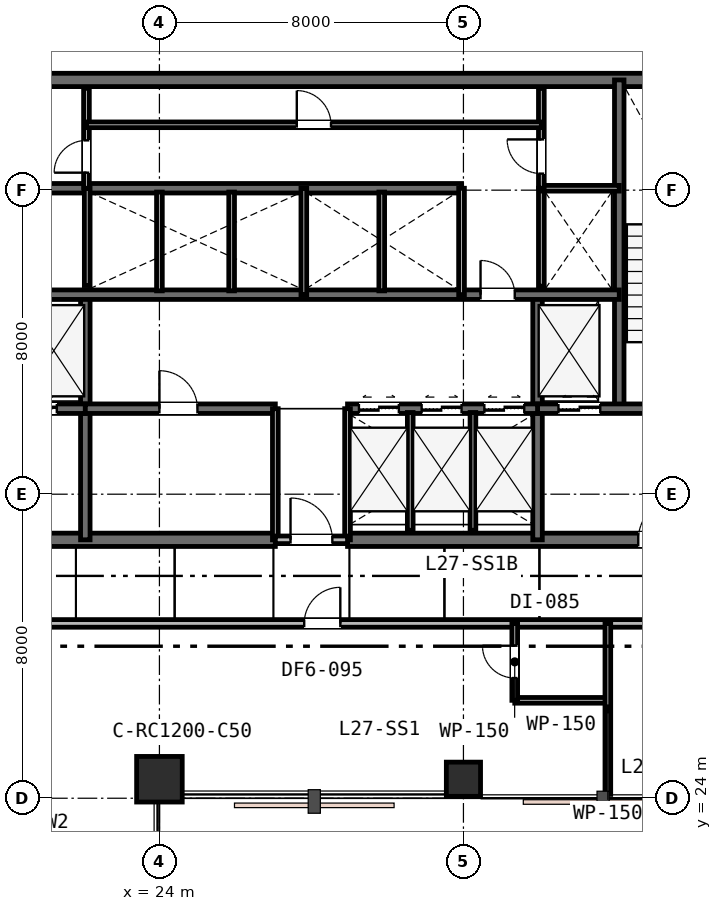
"""IFC4 building model, lengths in metres.
Left out: names, types, materials, properties, quantities, classifications, styles, units other than length and angle.
Written with IfcOpenShell. Run it as: python <this file> out.ifc"""

import sys

from ifc_helpers import new_model, si_unit, direction, frame, frame_2d, origin, origin_2d, place, context, subcontext, project, spatial, rectangle, extrude, element, fill, save


model = new_model("IFC4")
c1 = context("Model", 3, precision=1e-05, world=origin(), true_north=direction((0.0, 1.0)))
c2 = subcontext(c1, "Body", "Model", "MODEL_VIEW")
j1 = project(units=[si_unit("LENGTHUNIT", "METRE"), si_unit("PLANEANGLEUNIT", "RADIAN")], contexts=[c1])
p1 = place(None, origin())
s1 = spatial("IfcSite", under=j1, at=p1, CompositionType="ELEMENT")
p2 = place(p1, origin())
s2 = spatial("IfcBuilding", under=s1, at=p2, CompositionType="ELEMENT")
p3 = place(p2, frame((0.0, 0.0, 108.0)))
s3 = spatial("IfcBuildingStorey", under=s2, at=p3, CompositionType="ELEMENT", Elevation=108.0)
p4 = place(p3, frame((15.85, 42.9, 0.0), z_axis=(0.0, 0.0, 1.0), x_axis=(1.0, 0.0, 0.0)))
e1 = element("IfcWall", 1, at=p4, inside=s3, PredefinedType="SHEAR", context=c2, shape_type="SweptSolid", body=[
    extrude(rectangle(XDim=24.3, YDim=0.35, at=frame_2d((12.15, 0.0))), origin(), (0.0, 0.0, 1.0), 3.6),
])
p5 = place(p3, frame((15.85, 30.8, 0.0), z_axis=(0.0, 0.0, 1.0), x_axis=(1.0, 0.0, 0.0)))
e2 = element("IfcWall", 2, at=p5, inside=s3, PredefinedType="SHEAR", context=c2, shape_type="SweptSolid", body=[
    extrude(rectangle(XDim=11.2, YDim=0.35, at=frame_2d((5.6, 0.0))), origin(), (0.0, 0.0, 1.0), 3.6),
])
p6 = place(p5, frame((2.45, 0.0, 0.0)))
e3 = element("IfcOpeningElement", 3, at=p6, cuts=e2, PredefinedType="OPENING", context=c2, shape_type="SweptSolid", body=[
    extrude(rectangle(XDim=1.1, YDim=2.15, at=frame_2d((0.55, 1.075))), frame((0.0, 0.185, 0.0), z_axis=(0.0, -1.0, 0.0), x_axis=(1.0, 0.0, 0.0)), (0.0, 0.0, 1.0), 0.37),
])
p7 = place(p3, frame((28.95, 30.8, 0.0), z_axis=(0.0, 0.0, 1.0), x_axis=(1.0, 0.0, 0.0)))
e4 = element("IfcWall", 4, at=p7, inside=s3, PredefinedType="SHEAR", context=c2, shape_type="SweptSolid", body=[
    extrude(rectangle(XDim=11.2, YDim=0.35, at=frame_2d((5.6, 0.0))), origin(), (0.0, 0.0, 1.0), 3.6),
])
p8 = place(p7, frame((7.65, 0.0, 0.0)))
e5 = element("IfcOpeningElement", 5, at=p8, cuts=e4, PredefinedType="OPENING", context=c2, shape_type="SweptSolid", body=[
    extrude(rectangle(XDim=1.1, YDim=2.15, at=frame_2d((0.55, 1.075))), frame((0.0, 0.185, 0.0), z_axis=(0.0, -1.0, 0.0), x_axis=(1.0, 0.0, 0.0)), (0.0, 0.0, 1.0), 0.37),
])
p9 = place(p3, frame((36.1, 34.25, 0.0), z_axis=(0.0, 0.0, 1.0), x_axis=(0.0, 1.0, 0.0)))
e6 = element("IfcWall", 6, at=p9, inside=s3, PredefinedType="SHEAR", context=c2, shape_type="SweptSolid", body=[
    extrude(rectangle(XDim=8.65, YDim=0.25, at=frame_2d((4.325, 0.0))), origin(), (0.0, 0.0, 1.0), 3.6),
])
for number, where, z_axis, x_axis in (
    (7, (22.05, 30.8, 0.0), (0.0, 0.0, 1.0), (0.0, 1.0, 0.0)),
    (8, (33.95, 30.8, 0.0), (0.0, 0.0, 1.0), (0.0, 1.0, 0.0)),
):
    element("IfcWall", number, at=place(p3, frame(where, z_axis=z_axis, x_axis=x_axis)), inside=s3, PredefinedType="SHEAR", context=c2, shape_type="SweptSolid", body=[
        extrude(rectangle(XDim=6.45, YDim=0.25, at=frame_2d((3.225, 0.0))), origin(), (0.0, 0.0, 1.0), 3.6),
    ])
p10 = place(p3, frame((16.0, 34.25, 0.0), z_axis=(0.0, 0.0, 1.0), x_axis=(1.0, 0.0, 0.0)))
e9 = element("IfcWall", 9, at=p10, inside=s3, PredefinedType="SHEAR", context=c2, shape_type="SweptSolid", body=[
    extrude(rectangle(XDim=6.05, YDim=0.25, at=frame_2d((3.025, 0.0))), origin(), (0.0, 0.0, 1.0), 3.6),
])
p11 = place(p10, frame((1.25, 0.0, 0.0)))
e10 = element("IfcOpeningElement", 10, at=p11, cuts=e9, PredefinedType="OPENING", context=c2, shape_type="SweptSolid", body=[
    extrude(rectangle(XDim=1.0, YDim=2.15, at=frame_2d((0.5, 1.075))), frame((0.0, 0.135, 0.0), z_axis=(0.0, -1.0, 0.0), x_axis=(1.0, 0.0, 0.0)), (0.0, 0.0, 1.0), 0.27),
])
p12 = place(p10, frame((4.2, 0.0, 0.0)))
e11 = element("IfcOpeningElement", 11, at=p12, cuts=e9, PredefinedType="OPENING", context=c2, shape_type="SweptSolid", body=[
    extrude(rectangle(XDim=1.1, YDim=2.15, at=frame_2d((0.55, 1.075))), frame((0.0, 0.135, 0.0), z_axis=(0.0, -1.0, 0.0), x_axis=(1.0, 0.0, 0.0)), (0.0, 0.0, 1.0), 0.27),
])
p13 = place(p3, frame((33.95, 34.25, 0.0), z_axis=(0.0, 0.0, 1.0), x_axis=(1.0, 0.0, 0.0)))
e12 = element("IfcWall", 12, at=p13, inside=s3, PredefinedType="SHEAR", context=c2, shape_type="SweptSolid", body=[
    extrude(rectangle(XDim=6.05, YDim=0.25, at=frame_2d((3.025, 0.0))), origin(), (0.0, 0.0, 1.0), 3.6),
])
p14 = place(p13, frame((3.7, 0.0, 0.0)))
e13 = element("IfcOpeningElement", 13, at=p14, cuts=e12, PredefinedType="OPENING", context=c2, shape_type="SweptSolid", body=[
    extrude(rectangle(XDim=1.0, YDim=2.15, at=frame_2d((0.5, 1.075))), frame((0.0, 0.135, 0.0), z_axis=(0.0, -1.0, 0.0), x_axis=(1.0, 0.0, 0.0)), (0.0, 0.0, 1.0), 0.27),
])
p15 = place(p13, frame((0.55, 0.0, 0.0)))
e14 = element("IfcOpeningElement", 14, at=p15, cuts=e12, PredefinedType="OPENING", context=c2, shape_type="SweptSolid", body=[
    extrude(rectangle(XDim=1.1, YDim=2.15, at=frame_2d((0.55, 1.075))), frame((0.0, 0.135, 0.0), z_axis=(0.0, -1.0, 0.0), x_axis=(1.0, 0.0, 0.0)), (0.0, 0.0, 1.0), 0.27),
])
p16 = place(p3, frame((22.05, 34.25, 0.0), z_axis=(0.0, 0.0, 1.0), x_axis=(1.0, 0.0, 0.0)))
e15 = element("IfcWall", 15, at=p16, inside=s3, PredefinedType="SHEAR", context=c2, shape_type="SweptSolid", body=[
    extrude(rectangle(XDim=5.0, YDim=0.25, at=frame_2d((2.5, 0.0))), origin(), (0.0, 0.0, 1.0), 3.6),
])
p17 = place(p16, frame((1.95, 0.0, 0.0)))
e16 = element("IfcOpeningElement", 16, at=p17, cuts=e15, PredefinedType="OPENING", context=c2, shape_type="SweptSolid", body=[
    extrude(rectangle(XDim=1.0, YDim=2.15, at=frame_2d((0.5, 1.075))), frame((0.0, 0.135, 0.0), z_axis=(0.0, -1.0, 0.0), x_axis=(1.0, 0.0, 0.0)), (0.0, 0.0, 1.0), 0.27),
])
p18 = place(p3, frame((28.95, 34.25, 0.0), z_axis=(0.0, 0.0, 1.0), x_axis=(1.0, 0.0, 0.0)))
e17 = element("IfcWall", 17, at=p18, inside=s3, PredefinedType="SHEAR", context=c2, shape_type="SweptSolid", body=[
    extrude(rectangle(XDim=5.0, YDim=0.25, at=frame_2d((2.5, 0.0))), origin(), (0.0, 0.0, 1.0), 3.6),
])
p19 = place(p18, frame((0.3, 0.0, 0.0)))
e18 = element("IfcOpeningElement", 18, at=p19, cuts=e17, PredefinedType="OPENING", context=c2, shape_type="SweptSolid", body=[
    extrude(rectangle(XDim=1.05, YDim=2.15, at=frame_2d((0.525, 1.075))), frame((0.0, 0.135, 0.0), z_axis=(0.0, -1.0, 0.0), x_axis=(1.0, 0.0, 0.0)), (0.0, 0.0, 1.0), 0.27),
])
p20 = place(p18, frame((1.95, 0.0, 0.0)))
e19 = element("IfcOpeningElement", 19, at=p20, cuts=e17, PredefinedType="OPENING", context=c2, shape_type="SweptSolid", body=[
    extrude(rectangle(XDim=1.05, YDim=2.15, at=frame_2d((0.525, 1.075))), frame((0.0, 0.135, 0.0), z_axis=(0.0, -1.0, 0.0), x_axis=(1.0, 0.0, 0.0)), (0.0, 0.0, 1.0), 0.27),
])
p21 = place(p18, frame((3.6, 0.0, 0.0)))
e20 = element("IfcOpeningElement", 20, at=p21, cuts=e17, PredefinedType="OPENING", context=c2, shape_type="SweptSolid", body=[
    extrude(rectangle(XDim=1.05, YDim=2.15, at=frame_2d((0.525, 1.075))), frame((0.0, 0.135, 0.0), z_axis=(0.0, -1.0, 0.0), x_axis=(1.0, 0.0, 0.0)), (0.0, 0.0, 1.0), 0.27),
])
p22 = place(p3, frame((19.9, 37.25, 0.0), z_axis=(0.0, 0.0, 1.0), x_axis=(1.0, 0.0, 0.0)))
e21 = element("IfcWall", 21, at=p22, inside=s3, PredefinedType="SHEAR", context=c2, shape_type="SweptSolid", body=[
    extrude(rectangle(XDim=16.2, YDim=0.25, at=frame_2d((8.1, 0.0))), origin(), (0.0, 0.0, 1.0), 3.6),
])
p23 = place(p22, frame((12.55, 0.0, 0.0)))
e22 = element("IfcOpeningElement", 22, at=p23, cuts=e21, PredefinedType="OPENING", context=c2, shape_type="SweptSolid", body=[
    extrude(rectangle(XDim=0.9, YDim=2.15, at=frame_2d((0.45, 1.075))), frame((0.0, 0.135, 0.0), z_axis=(0.0, -1.0, 0.0), x_axis=(1.0, 0.0, 0.0)), (0.0, 0.0, 1.0), 0.27),
])
p24 = place(p3, frame((19.9, 40.05, 0.0), z_axis=(0.0, 0.0, 1.0), x_axis=(1.0, 0.0, 0.0)))
e23 = element("IfcWall", 23, at=p24, inside=s3, PredefinedType="SHEAR", context=c2, shape_type="SweptSolid", body=[
    extrude(rectangle(XDim=12.05, YDim=0.25, at=frame_2d((6.025, 0.0))), origin(), (0.0, 0.0, 1.0), 3.6),
])
p25 = place(p3, frame((24.0, 24.5, 0.0), z_axis=(0.0, 0.0, 1.0), x_axis=(1.0, 0.0, 0.0)))
e24 = element("IfcColumn", 24, at=p25, inside=s3, PredefinedType="COLUMN", context=c2, shape_type="SweptSolid", body=[
    extrude(rectangle(XDim=1.2, YDim=1.2, at=origin_2d()), origin(), (0.0, 0.0, 1.0), 3.6),
])
p26 = place(p3, frame((32.0, 24.5, 0.0), z_axis=(0.0, 0.0, 1.0), x_axis=(1.0, 0.0, 0.0)))
e25 = element("IfcColumn", 25, at=p26, inside=s3, PredefinedType="COLUMN", context=c2, shape_type="SweptSolid", body=[
    extrude(rectangle(XDim=0.9, YDim=0.9, at=origin_2d()), origin(), (0.0, 0.0, 1.0), 3.6),
])
p27 = place(p3, frame((27.05, 30.8, 0.0), z_axis=(0.0, 0.0, 1.0), x_axis=(0.0, 1.0, 0.0)))
e26 = element("IfcWall", 26, at=p27, inside=s3, PredefinedType="PLUMBINGWALL", context=c2, shape_type="SweptSolid", body=[
    extrude(rectangle(XDim=3.45, YDim=0.15, at=frame_2d((1.725, 0.0))), origin(), (0.0, 0.0, 1.0), 3.01),
])
p28 = place(p3, frame((28.95, 30.8, 0.0), z_axis=(0.0, 0.0, 1.0), x_axis=(0.0, 1.0, 0.0)))
e27 = element("IfcWall", 27, at=p28, inside=s3, PredefinedType="PLUMBINGWALL", context=c2, shape_type="SweptSolid", body=[
    extrude(rectangle(XDim=3.45, YDim=0.15, at=frame_2d((1.725, 0.0))), origin(), (0.0, 0.0, 1.0), 3.33),
])
p29 = place(p3, frame((27.05, 30.8, 0.0), z_axis=(0.0, 0.0, 1.0), x_axis=(1.0, 0.0, 0.0)))
e28 = element("IfcWall", 28, at=p29, inside=s3, PredefinedType="PARTITIONING", context=c2, shape_type="SweptSolid", body=[
    extrude(rectangle(XDim=1.9, YDim=0.2, at=frame_2d((0.95, 0.0))), origin(), (0.0, 0.0, 1.0), 3.01),
])
p30 = place(p29, frame((0.4, 0.0, 0.0)))
e29 = element("IfcOpeningElement", 29, at=p30, cuts=e28, PredefinedType="OPENING", context=c2, shape_type="SweptSolid", body=[
    extrude(rectangle(XDim=1.1, YDim=2.15, at=frame_2d((0.55, 1.075))), frame((0.0, 0.11, 0.0), z_axis=(0.0, -1.0, 0.0), x_axis=(1.0, 0.0, 0.0)), (0.0, 0.0, 1.0), 0.22),
])
for number, where, z_axis, x_axis in (
    (30, (30.6, 31.05, 0.0), (0.0, 0.0, 1.0), (0.0, 1.0, 0.0)),
    (31, (32.25, 31.05, 0.0), (0.0, 0.0, 1.0), (0.0, 1.0, 0.0)),
):
    element("IfcWall", number, at=place(p3, frame(where, z_axis=z_axis, x_axis=x_axis)), inside=s3, PredefinedType="PLUMBINGWALL", context=c2, shape_type="SweptSolid", body=[
        extrude(rectangle(XDim=3.1, YDim=0.15, at=frame_2d((1.55, 0.0))), origin(), (0.0, 0.0, 1.0), 3.33),
    ])
p31 = place(p3, frame((22.1, 37.49, 0.0), z_axis=(0.0, 0.0, 1.0), x_axis=(0.0, 1.0, 0.0)))
e32 = element("IfcWall", 32, at=p31, inside=s3, PredefinedType="PLUMBINGWALL", context=c2, shape_type="SweptSolid", body=[
    extrude(rectangle(XDim=2.56, YDim=0.15, at=frame_2d((1.28, 0.0))), origin(), (0.0, 0.0, 1.0), 3.33),
])
p32 = place(p3, frame((27.8, 37.25, 0.0), z_axis=(0.0, 0.0, 1.0), x_axis=(0.0, 1.0, 0.0)))
e33 = element("IfcWall", 33, at=p32, inside=s3, PredefinedType="PLUMBINGWALL", context=c2, shape_type="SweptSolid", body=[
    extrude(rectangle(XDim=2.8, YDim=0.15, at=frame_2d((1.4, 0.0))), origin(), (0.0, 0.0, 1.0), 3.33),
])
for number, where, z_axis, x_axis in (
    (34, (24.0, 37.35, 0.0), (0.0, 0.0, 1.0), (0.0, 1.0, 0.0)),
    (35, (25.9, 37.35, 0.0), (0.0, 0.0, 1.0), (0.0, 1.0, 0.0)),
):
    element("IfcWall", number, at=place(p3, frame(where, z_axis=z_axis, x_axis=x_axis)), inside=s3, PredefinedType="PLUMBINGWALL", context=c2, shape_type="SweptSolid", body=[
        extrude(rectangle(XDim=2.6, YDim=0.15, at=frame_2d((1.3, 0.0))), origin(), (0.0, 0.0, 1.0), 3.33),
    ])
p33 = place(p3, frame((31.95, 37.25, 0.0), z_axis=(0.0, 0.0, 1.0), x_axis=(0.0, 1.0, 0.0)))
e36 = element("IfcWall", 36, at=p33, inside=s3, PredefinedType="PLUMBINGWALL", context=c2, shape_type="SweptSolid", body=[
    extrude(rectangle(XDim=2.8, YDim=0.15, at=frame_2d((1.4, 0.0))), origin(), (0.0, 0.0, 1.0), 3.33),
])
p34 = place(p3, frame((29.85, 37.35, 0.0), z_axis=(0.0, 0.0, 1.0), x_axis=(0.0, 1.0, 0.0)))
e37 = element("IfcWall", 37, at=p34, inside=s3, PredefinedType="PLUMBINGWALL", context=c2, shape_type="SweptSolid", body=[
    extrude(rectangle(XDim=2.6, YDim=0.15, at=frame_2d((1.3, 0.0))), origin(), (0.0, 0.0, 1.0), 3.33),
])
p35 = place(p3, frame((34.05, 37.473, 0.0), z_axis=(0.0, 0.0, 1.0), x_axis=(0.0, 1.0, 0.0)))
e38 = element("IfcWall", 38, at=p35, inside=s3, PredefinedType="PLUMBINGWALL", context=c2, shape_type="SweptSolid", body=[
    extrude(rectangle(XDim=2.577, YDim=0.15, at=frame_2d((1.288, 0.0))), origin(), (0.0, 0.0, 1.0), 3.33),
])
p36 = place(p3, frame((34.05, 40.05, 0.0), z_axis=(0.0, 0.0, 1.0), x_axis=(1.0, 0.0, 0.0)))
e39 = element("IfcWall", 39, at=p36, inside=s3, PredefinedType="PARTITIONING", context=c2, shape_type="SweptSolid", body=[
    extrude(rectangle(XDim=2.05, YDim=0.15, at=frame_2d((1.025, 0.0))), origin(), (0.0, 0.0, 1.0), 3.33),
])
p37 = place(p3, frame((34.05, 40.05, 0.0), z_axis=(0.0, 0.0, 1.0), x_axis=(0.0, 1.0, 0.0)))
e40 = element("IfcWall", 40, at=p37, inside=s3, PredefinedType="PARTITIONING", context=c2, shape_type="SweptSolid", body=[
    extrude(rectangle(XDim=2.63, YDim=0.15, at=frame_2d((1.315, 0.0))), origin(), (0.0, 0.0, 1.0), 3.33),
])
p38 = place(p37, frame((0.385, 0.0, 0.0)))
e41 = element("IfcOpeningElement", 41, at=p38, cuts=e40, PredefinedType="OPENING", context=c2, shape_type="SweptSolid", body=[
    extrude(rectangle(XDim=0.9, YDim=2.15, at=frame_2d((0.45, 1.075))), frame((0.0, 0.085, 0.0), z_axis=(0.0, -1.0, 0.0), x_axis=(1.0, 0.0, 0.0)), (0.0, 0.0, 1.0), 0.17),
])
p39 = place(p3, frame((22.08, 40.05, 0.0), z_axis=(0.0, 0.0, 1.0), x_axis=(0.0, 1.0, 0.0)))
e42 = element("IfcWall", 42, at=p39, inside=s3, PredefinedType="PARTITIONING", context=c2, shape_type="SweptSolid", body=[
    extrude(rectangle(XDim=2.63, YDim=0.15, at=frame_2d((1.315, 0.0))), origin(), (0.0, 0.0, 1.0), 3.33),
])
p40 = place(p39, frame((0.41, 0.0, 0.0)))
e43 = element("IfcOpeningElement", 43, at=p40, cuts=e42, PredefinedType="OPENING", context=c2, shape_type="SweptSolid", body=[
    extrude(rectangle(XDim=0.85, YDim=2.15, at=frame_2d((0.425, 1.075))), frame((0.0, 0.085, 0.0), z_axis=(0.0, -1.0, 0.0), x_axis=(1.0, 0.0, 0.0)), (0.0, 0.0, 1.0), 0.17),
])
p41 = place(p3, frame((22.08, 41.72, 0.0), z_axis=(0.0, 0.0, 1.0), x_axis=(1.0, 0.0, 0.0)))
e44 = element("IfcWall", 44, at=p41, inside=s3, PredefinedType="PARTITIONING", context=c2, shape_type="SweptSolid", body=[
    extrude(rectangle(XDim=11.97, YDim=0.15, at=frame_2d((5.985, 0.0))), origin(), (0.0, 0.0, 1.0), 3.33),
])
p42 = place(p41, frame((5.535, 0.0, 0.0)))
e45 = element("IfcOpeningElement", 45, at=p42, cuts=e44, PredefinedType="OPENING", context=c2, shape_type="SweptSolid", body=[
    extrude(rectangle(XDim=0.9, YDim=2.15, at=frame_2d((0.45, 1.075))), frame((0.0, 0.085, 0.0), z_axis=(0.0, -1.0, 0.0), x_axis=(1.0, 0.0, 0.0)), (0.0, 0.0, 1.0), 0.17),
])
p43 = place(p3, frame((15.4, 28.6, 0.0), z_axis=(0.0, 0.0, 1.0), x_axis=(1.0, 0.0, 0.0)))
e46 = element("IfcWall", 46, at=p43, inside=s3, PredefinedType="PARTITIONING", context=c2, shape_type="SweptSolid", body=[
    extrude(rectangle(XDim=28.8, YDim=0.2, at=frame_2d((14.4, 0.0))), origin(), (0.0, 0.0, 1.0), 2.87),
])
p44 = place(p43, frame((12.41, 0.0, 0.0)))
e47 = element("IfcOpeningElement", 47, at=p44, cuts=e46, PredefinedType="OPENING", context=c2, shape_type="SweptSolid", body=[
    extrude(rectangle(XDim=0.95, YDim=2.15, at=frame_2d((0.475, 1.075))), frame((0.0, 0.11, 0.0), z_axis=(0.0, -1.0, 0.0), x_axis=(1.0, 0.0, 0.0)), (0.0, 0.0, 1.0), 0.22),
])
p45 = place(p43, frame((22.68, 0.0, 0.0)))
e48 = element("IfcOpeningElement", 48, at=p45, cuts=e46, PredefinedType="OPENING", context=c2, shape_type="SweptSolid", body=[
    extrude(rectangle(XDim=0.95, YDim=2.15, at=frame_2d((0.475, 1.075))), frame((0.0, 0.11, 0.0), z_axis=(0.0, -1.0, 0.0), x_axis=(1.0, 0.0, 0.0)), (0.0, 0.0, 1.0), 0.22),
])
p46 = place(p3, frame((33.35, 26.576, 0.0), z_axis=(0.0, 0.0, 1.0), x_axis=(1.0, 0.0, 0.0)))
e49 = element("IfcWall", 49, at=p46, inside=s3, PredefinedType="PARTITIONING", context=c2, shape_type="SweptSolid", body=[
    extrude(rectangle(XDim=2.45, YDim=0.15, at=frame_2d((1.225, 0.0))), origin(), (0.0, 0.0, 1.0), 3.01),
])
p47 = place(p3, frame((33.35, 26.576, 0.0), z_axis=(0.0, 0.0, 1.0), x_axis=(0.0, 1.0, 0.0)))
e50 = element("IfcWall", 50, at=p47, inside=s3, PredefinedType="PARTITIONING", context=c2, shape_type="SweptSolid", body=[
    extrude(rectangle(XDim=2.024, YDim=0.15, at=frame_2d((1.012, 0.0))), origin(), (0.0, 0.0, 1.0), 3.33),
])
p48 = place(p47, frame((0.587, 0.0, 0.0)))
e51 = element("IfcOpeningElement", 51, at=p48, cuts=e50, PredefinedType="OPENING", context=c2, shape_type="SweptSolid", body=[
    extrude(rectangle(XDim=0.85, YDim=2.15, at=frame_2d((0.425, 1.075))), frame((0.0, 0.085, 0.0), z_axis=(0.0, -1.0, 0.0), x_axis=(1.0, 0.0, 0.0)), (0.0, 0.0, 1.0), 0.17),
])
p49 = place(p3, frame((35.8, 28.6, 0.0), z_axis=(0.0, 0.0, 1.0), x_axis=(0.0, -1.0, 0.0)))
e52 = element("IfcWall", 52, at=p49, inside=s3, PredefinedType="PARTITIONING", context=c2, shape_type="SweptSolid", body=[
    extrude(rectangle(XDim=4.5, YDim=0.15, at=frame_2d((2.25, 0.0))), origin(), (0.0, 0.0, 1.0), 2.96),
])
p50 = place(p30, origin())
e53 = element("IfcDoor", 53, at=p50, inside=s3, OperationType="SINGLE_SWING_LEFT", PredefinedType="DOOR", context=c2, shape_type="SweptSolid", body=[
    extrude(rectangle(XDim=1.1, YDim=2.15, at=frame_2d((0.55, 1.075))), frame((0.0, 0.025, 0.0), z_axis=(0.0, -1.0, 0.0), x_axis=(1.0, 0.0, 0.0)), (0.0, 0.0, 1.0), 0.05),
])
fill(e29, e53)
p51 = place(p8, origin())
e54 = element("IfcDoor", 54, at=p51, inside=s3, OperationType="SINGLE_SWING_RIGHT", PredefinedType="DOOR", context=c2, shape_type="SweptSolid", body=[
    extrude(rectangle(XDim=1.1, YDim=2.15, at=frame_2d((0.55, 1.075))), frame((0.0, 0.025, 0.0), z_axis=(0.0, -1.0, 0.0), x_axis=(1.0, 0.0, 0.0)), (0.0, 0.0, 1.0), 0.05),
])
fill(e5, e54)
p52 = place(p17, origin())
e55 = element("IfcDoor", 55, at=p52, inside=s3, OperationType="SINGLE_SWING_LEFT", PredefinedType="DOOR", context=c2, shape_type="SweptSolid", body=[
    extrude(rectangle(XDim=1.0, YDim=2.15, at=frame_2d((0.5, 1.075))), frame((0.0, 0.025, 0.0), z_axis=(0.0, -1.0, 0.0), x_axis=(1.0, 0.0, 0.0)), (0.0, 0.0, 1.0), 0.05),
])
fill(e16, e55)
p53 = place(p23, origin())
e56 = element("IfcDoor", 56, at=p53, inside=s3, OperationType="SINGLE_SWING_LEFT", PredefinedType="DOOR", context=c2, shape_type="SweptSolid", body=[
    extrude(rectangle(XDim=0.9, YDim=2.15, at=frame_2d((0.45, 1.075))), frame((0.0, 0.025, 0.0), z_axis=(0.0, -1.0, 0.0), x_axis=(1.0, 0.0, 0.0)), (0.0, 0.0, 1.0), 0.05),
])
fill(e22, e56)
p54 = place(p38, origin())
e57 = element("IfcDoor", 57, at=p54, inside=s3, OperationType="SINGLE_SWING_RIGHT", PredefinedType="DOOR", context=c2, shape_type="SweptSolid", body=[
    extrude(rectangle(XDim=0.9, YDim=2.15, at=frame_2d((0.45, 1.075))), frame((0.0, 0.025, 0.0), z_axis=(0.0, -1.0, 0.0), x_axis=(1.0, 0.0, 0.0)), (0.0, 0.0, 1.0), 0.05),
])
fill(e41, e57)
p55 = place(p40, origin())
e58 = element("IfcDoor", 58, at=p55, inside=s3, OperationType="SINGLE_SWING_LEFT", PredefinedType="DOOR", context=c2, shape_type="SweptSolid", body=[
    extrude(rectangle(XDim=0.85, YDim=2.15, at=frame_2d((0.425, 1.075))), frame((0.0, 0.025, 0.0), z_axis=(0.0, -1.0, 0.0), x_axis=(1.0, 0.0, 0.0)), (0.0, 0.0, 1.0), 0.05),
])
fill(e43, e58)
p56 = place(p42, origin())
e59 = element("IfcDoor", 59, at=p56, inside=s3, OperationType="SINGLE_SWING_LEFT", PredefinedType="DOOR", context=c2, shape_type="SweptSolid", body=[
    extrude(rectangle(XDim=0.9, YDim=2.15, at=frame_2d((0.45, 1.075))), frame((0.0, 0.025, 0.0), z_axis=(0.0, -1.0, 0.0), x_axis=(1.0, 0.0, 0.0)), (0.0, 0.0, 1.0), 0.05),
])
fill(e45, e59)
p57 = place(p44, origin())
e60 = element("IfcDoor", 60, at=p57, inside=s3, OperationType="SINGLE_SWING_RIGHT", PredefinedType="DOOR", context=c2, shape_type="SweptSolid", body=[
    extrude(rectangle(XDim=0.95, YDim=2.15, at=frame_2d((0.475, 1.075))), frame((0.0, 0.025, 0.0), z_axis=(0.0, -1.0, 0.0), x_axis=(1.0, 0.0, 0.0)), (0.0, 0.0, 1.0), 0.05),
])
fill(e47, e60)
p58 = place(p48, origin())
e61 = element("IfcDoor", 61, at=p58, inside=s3, OperationType="SINGLE_SWING_RIGHT", PredefinedType="DOOR", context=c2, shape_type="SweptSolid", body=[
    extrude(rectangle(XDim=0.85, YDim=2.15, at=frame_2d((0.425, 1.075))), frame((0.0, 0.025, 0.0), z_axis=(0.0, -1.0, 0.0), x_axis=(1.0, 0.0, 0.0)), (0.0, 0.0, 1.0), 0.05),
])
fill(e51, e61)
p59 = place(p12, origin())
e62 = element("IfcDoor", 62, at=p59, inside=s3, OperationType="DOUBLE_DOOR_SLIDING", PredefinedType="DOOR", context=c2, shape_type="SweptSolid", body=[
    extrude(rectangle(XDim=1.1, YDim=2.15, at=frame_2d((0.55, 1.075))), frame((0.0, 0.025, 0.0), z_axis=(0.0, -1.0, 0.0), x_axis=(1.0, 0.0, 0.0)), (0.0, 0.0, 1.0), 0.05),
])
fill(e11, e62)
p60 = place(p15, origin())
e63 = element("IfcDoor", 63, at=p60, inside=s3, OperationType="DOUBLE_DOOR_SLIDING", PredefinedType="DOOR", context=c2, shape_type="SweptSolid", body=[
    extrude(rectangle(XDim=1.1, YDim=2.15, at=frame_2d((0.55, 1.075))), frame((0.0, 0.025, 0.0), z_axis=(0.0, -1.0, 0.0), x_axis=(1.0, 0.0, 0.0)), (0.0, 0.0, 1.0), 0.05),
])
fill(e14, e63)
p61 = place(p19, origin())
e64 = element("IfcDoor", 64, at=p61, inside=s3, OperationType="DOUBLE_DOOR_SLIDING", PredefinedType="DOOR", context=c2, shape_type="SweptSolid", body=[
    extrude(rectangle(XDim=1.05, YDim=2.15, at=frame_2d((0.525, 1.075))), frame((0.0, 0.025, 0.0), z_axis=(0.0, -1.0, 0.0), x_axis=(1.0, 0.0, 0.0)), (0.0, 0.0, 1.0), 0.05),
])
fill(e18, e64)
p62 = place(p20, origin())
e65 = element("IfcDoor", 65, at=p62, inside=s3, OperationType="DOUBLE_DOOR_SLIDING", PredefinedType="DOOR", context=c2, shape_type="SweptSolid", body=[
    extrude(rectangle(XDim=1.05, YDim=2.15, at=frame_2d((0.525, 1.075))), frame((0.0, 0.025, 0.0), z_axis=(0.0, -1.0, 0.0), x_axis=(1.0, 0.0, 0.0)), (0.0, 0.0, 1.0), 0.05),
])
fill(e19, e65)
p63 = place(p21, origin())
e66 = element("IfcDoor", 66, at=p63, inside=s3, OperationType="DOUBLE_DOOR_SLIDING", PredefinedType="DOOR", context=c2, shape_type="SweptSolid", body=[
    extrude(rectangle(XDim=1.05, YDim=2.15, at=frame_2d((0.525, 1.075))), frame((0.0, 0.025, 0.0), z_axis=(0.0, -1.0, 0.0), x_axis=(1.0, 0.0, 0.0)), (0.0, 0.0, 1.0), 0.05),
])
fill(e20, e66)
save(model, sys.argv[1])
